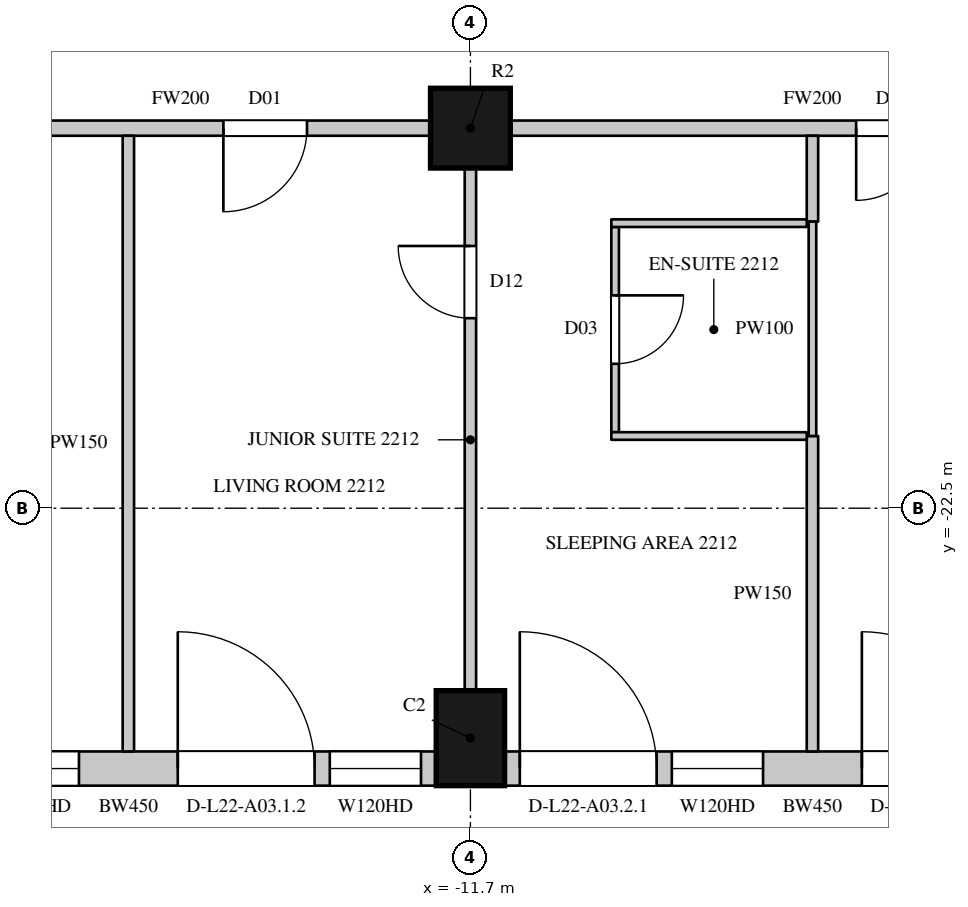
"""IFC4 building model, lengths in metres.
Left out: names, types, materials, properties, quantities, classifications, styles, units other than length and angle.
Written with IfcOpenShell. Run it as: python <this file> out.ifc"""

import sys

from ifc_helpers import new_model, si_unit, direction, frame, frame_2d, origin, origin_2d, place, context, subcontext, project, spatial, rectangle, circle, extrude, element, fill, save


model = new_model("IFC4")
c1 = context("Model", 3, precision=1e-05, world=origin(), true_north=direction((0.0, 1.0)))
c2 = subcontext(c1, "Body", "Model", "MODEL_VIEW")
j1 = project(units=[si_unit("LENGTHUNIT", "METRE"), si_unit("PLANEANGLEUNIT", "RADIAN")], contexts=[c1])
p1 = place(None, origin())
s1 = spatial("IfcSite", under=j1, at=p1, CompositionType="ELEMENT")
p2 = place(p1, origin())
s2 = spatial("IfcBuilding", under=s1, at=p2, CompositionType="ELEMENT")
p3 = place(p2, frame((0.0, 0.0, 109.5)))
s3 = spatial("IfcBuildingStorey", under=s2, at=p3, CompositionType="ELEMENT", Elevation=109.5)
p4 = place(p3, frame((-11.7, -25.525, 0.0), z_axis=(0.0, 0.0, 1.0), x_axis=(1.0, 0.0, 0.0)))
e1 = element("IfcColumn", 1, at=p4, inside=s3, PredefinedType="COLUMN", context=c2, shape_type="SweptSolid", body=[
    extrude(rectangle(XDim=0.9, YDim=1.25, at=origin_2d()), origin(), (0.0, 0.0, 1.0), 3.6),
])
p5 = place(p3, frame((-11.7, -17.5, 0.0), z_axis=(0.0, 0.0, 1.0), x_axis=(1.0, 0.0, 0.0)))
e2 = element("IfcColumn", 2, at=p5, inside=s3, PredefinedType="COLUMN", context=c2, shape_type="SweptSolid", body=[
    extrude(circle(Radius=0.525, at=origin_2d()), origin(), (0.0, 0.0, 1.0), 3.6),
])
p6 = place(p3, frame((-20.25, -25.925, 0.0), z_axis=(0.0, 0.0, 1.0), x_axis=(1.0, 0.0, 0.0)))
e3 = element("IfcWall", 3, at=p6, inside=s3, PredefinedType="SOLIDWALL", context=c2, shape_type="SweptSolid", body=[
    extrude(rectangle(XDim=8.1, YDim=0.45, at=frame_2d((4.05, 0.0))), origin(), (0.0, 0.0, 1.0), 3.3),
])
p7 = place(p6, frame((0.2, 0.0, 0.0)))
e4 = element("IfcOpeningElement", 4, at=p7, cuts=e3, PredefinedType="OPENING", context=c2, shape_type="SweptSolid", body=[
    extrude(rectangle(XDim=1.8, YDim=2.4, at=frame_2d((0.9, 1.2))), frame((0.0, 0.235, 0.0), z_axis=(0.0, -1.0, 0.0), x_axis=(1.0, 0.0, 0.0)), (0.0, 0.0, 1.0), 0.47),
])
p8 = place(p6, frame((2.2, 0.0, 1.05)))
e5 = element("IfcOpeningElement", 5, at=p8, cuts=e3, PredefinedType="OPENING", context=c2, shape_type="SweptSolid", body=[
    extrude(rectangle(XDim=1.2, YDim=2.0, at=frame_2d((0.6, 1.0))), frame((0.0, 0.235, 0.0), z_axis=(0.0, -1.0, 0.0), x_axis=(1.0, 0.0, 0.0)), (0.0, 0.0, 1.0), 0.47),
])
p9 = place(p6, frame((4.7, 0.0, 0.0)))
e6 = element("IfcOpeningElement", 6, at=p9, cuts=e3, PredefinedType="OPENING", context=c2, shape_type="SweptSolid", body=[
    extrude(rectangle(XDim=1.8, YDim=2.4, at=frame_2d((0.9, 1.2))), frame((0.0, 0.235, 0.0), z_axis=(0.0, -1.0, 0.0), x_axis=(1.0, 0.0, 0.0)), (0.0, 0.0, 1.0), 0.47),
])
p10 = place(p6, frame((6.7, 0.0, 1.05)))
e7 = element("IfcOpeningElement", 7, at=p10, cuts=e3, PredefinedType="OPENING", context=c2, shape_type="SweptSolid", body=[
    extrude(rectangle(XDim=1.2, YDim=2.0, at=frame_2d((0.6, 1.0))), frame((0.0, 0.235, 0.0), z_axis=(0.0, -1.0, 0.0), x_axis=(1.0, 0.0, 0.0)), (0.0, 0.0, 1.0), 0.47),
])
p11 = place(p3, frame((-11.25, -25.925, 0.0), z_axis=(0.0, 0.0, 1.0), x_axis=(1.0, 0.0, 0.0)))
e8 = element("IfcWall", 8, at=p11, inside=s3, PredefinedType="SOLIDWALL", context=c2, shape_type="SweptSolid", body=[
    extrude(rectangle(XDim=8.1, YDim=0.45, at=frame_2d((4.05, 0.0))), origin(), (0.0, 0.0, 1.0), 3.3),
])
p12 = place(p11, frame((0.2, 0.0, 0.0)))
e9 = element("IfcOpeningElement", 9, at=p12, cuts=e8, PredefinedType="OPENING", context=c2, shape_type="SweptSolid", body=[
    extrude(rectangle(XDim=1.8, YDim=2.4, at=frame_2d((0.9, 1.2))), frame((0.0, 0.235, 0.0), z_axis=(0.0, -1.0, 0.0), x_axis=(1.0, 0.0, 0.0)), (0.0, 0.0, 1.0), 0.47),
])
p13 = place(p11, frame((2.2, 0.0, 1.05)))
e10 = element("IfcOpeningElement", 10, at=p13, cuts=e8, PredefinedType="OPENING", context=c2, shape_type="SweptSolid", body=[
    extrude(rectangle(XDim=1.2, YDim=2.0, at=frame_2d((0.6, 1.0))), frame((0.0, 0.235, 0.0), z_axis=(0.0, -1.0, 0.0), x_axis=(1.0, 0.0, 0.0)), (0.0, 0.0, 1.0), 0.47),
])
p14 = place(p11, frame((4.7, 0.0, 0.0)))
e11 = element("IfcOpeningElement", 11, at=p14, cuts=e8, PredefinedType="OPENING", context=c2, shape_type="SweptSolid", body=[
    extrude(rectangle(XDim=1.8, YDim=2.4, at=frame_2d((0.9, 1.2))), frame((0.0, 0.235, 0.0), z_axis=(0.0, -1.0, 0.0), x_axis=(1.0, 0.0, 0.0)), (0.0, 0.0, 1.0), 0.47),
])
p15 = place(p11, frame((6.7, 0.0, 1.05)))
e12 = element("IfcOpeningElement", 12, at=p15, cuts=e8, PredefinedType="OPENING", context=c2, shape_type="SweptSolid", body=[
    extrude(rectangle(XDim=1.2, YDim=2.0, at=frame_2d((0.6, 1.0))), frame((0.0, 0.235, 0.0), z_axis=(0.0, -1.0, 0.0), x_axis=(1.0, 0.0, 0.0)), (0.0, 0.0, 1.0), 0.47),
])
p16 = place(p3, frame((-18.8, -17.5, 0.0), z_axis=(0.0, 0.0, 1.0), x_axis=(1.0, 0.0, 0.0)))
e13 = element("IfcWall", 13, at=p16, inside=s3, PredefinedType="PARTITIONING", context=c2, shape_type="SweptSolid", body=[
    extrude(rectangle(XDim=6.575, YDim=0.2, at=frame_2d((3.288, 0.0))), origin(), (0.0, 0.0, 1.0), 2.75),
])
p17 = place(p16, frame((3.85, 0.0, 0.0)))
e14 = element("IfcOpeningElement", 14, at=p17, cuts=e13, PredefinedType="OPENING", context=c2, shape_type="SweptSolid", body=[
    extrude(rectangle(XDim=1.1, YDim=2.4, at=frame_2d((0.55, 1.2))), frame((0.0, 0.11, 0.0), z_axis=(0.0, -1.0, 0.0), x_axis=(1.0, 0.0, 0.0)), (0.0, 0.0, 1.0), 0.22),
])
p18 = place(p3, frame((-11.175, -17.5, 0.0), z_axis=(0.0, 0.0, 1.0), x_axis=(1.0, 0.0, 0.0)))
e15 = element("IfcWall", 15, at=p18, inside=s3, PredefinedType="PARTITIONING", context=c2, shape_type="SweptSolid", body=[
    extrude(rectangle(XDim=7.95, YDim=0.2, at=frame_2d((3.975, 0.0))), origin(), (0.0, 0.0, 1.0), 2.75),
])
p19 = place(p18, frame((4.55, 0.0, 0.0)))
e16 = element("IfcOpeningElement", 16, at=p19, cuts=e15, PredefinedType="OPENING", context=c2, shape_type="SweptSolid", body=[
    extrude(rectangle(XDim=0.95, YDim=2.2, at=frame_2d((0.475, 1.1))), frame((0.0, 0.11, 0.0), z_axis=(0.0, -1.0, 0.0), x_axis=(1.0, 0.0, 0.0)), (0.0, 0.0, 1.0), 0.22),
])
p20 = place(p3, frame((-16.2, -25.7, 0.0), z_axis=(0.0, 0.0, 1.0), x_axis=(0.0, 1.0, 0.0)))
e17 = element("IfcWall", 17, at=p20, inside=s3, PredefinedType="PARTITIONING", context=c2, shape_type="SweptSolid", body=[
    extrude(rectangle(XDim=8.1, YDim=0.15, at=frame_2d((4.05, 0.0))), origin(), (0.0, 0.0, 1.0), 2.65),
])
p21 = place(p3, frame((-11.7, -24.9, 0.0), z_axis=(0.0, 0.0, 1.0), x_axis=(0.0, 1.0, 0.0)))
e18 = element("IfcWall", 18, at=p21, inside=s3, PredefinedType="PARTITIONING", context=c2, shape_type="SweptSolid", body=[
    extrude(rectangle(XDim=6.875, YDim=0.15, at=frame_2d((3.438, 0.0))), origin(), (0.0, 0.0, 1.0), 2.75),
])
p22 = place(p21, frame((4.9, 0.0, 0.0)))
e19 = element("IfcOpeningElement", 19, at=p22, cuts=e18, PredefinedType="OPENING", context=c2, shape_type="SweptSolid", body=[
    extrude(rectangle(XDim=0.95, YDim=2.2, at=frame_2d((0.475, 1.1))), frame((0.0, 0.085, 0.0), z_axis=(0.0, -1.0, 0.0), x_axis=(1.0, 0.0, 0.0)), (0.0, 0.0, 1.0), 0.17),
])
p23 = place(p3, frame((-7.2, -25.7, 0.0), z_axis=(0.0, 0.0, 1.0), x_axis=(0.0, 1.0, 0.0)))
e20 = element("IfcWall", 20, at=p23, inside=s3, PredefinedType="PARTITIONING", context=c2, shape_type="SweptSolid", body=[
    extrude(rectangle(XDim=4.15, YDim=0.15, at=frame_2d((2.075, 0.0))), origin(), (0.0, 0.0, 1.0), 2.65),
])
p24 = place(p3, frame((-7.2, -18.73, 0.0), z_axis=(0.0, 0.0, 1.0), x_axis=(0.0, 1.0, 0.0)))
e21 = element("IfcWall", 21, at=p24, inside=s3, PredefinedType="PARTITIONING", context=c2, shape_type="SweptSolid", body=[
    extrude(rectangle(XDim=1.13, YDim=0.15, at=frame_2d((0.565, 0.0))), origin(), (0.0, 0.0, 1.0), 2.65),
])
p25 = place(p3, frame((-9.796, -21.5, 0.0), z_axis=(0.0, 0.0, 1.0), x_axis=(0.0, 1.0, 0.0)))
e22 = element("IfcWall", 22, at=p25, inside=s3, PredefinedType="PARTITIONING", context=c2, shape_type="SweptSolid", body=[
    extrude(rectangle(XDim=2.7, YDim=0.1, at=frame_2d((1.35, 0.0))), origin(), (0.0, 0.0, 1.0), 3.3),
])
p26 = place(p25, frame((0.9, 0.0, 0.0)))
e23 = element("IfcOpeningElement", 23, at=p26, cuts=e22, PredefinedType="OPENING", context=c2, shape_type="SweptSolid", body=[
    extrude(rectangle(XDim=0.9, YDim=2.2, at=frame_2d((0.45, 1.1))), frame((0.0, 0.06, 0.0), z_axis=(0.0, -1.0, 0.0), x_axis=(1.0, 0.0, 0.0)), (0.0, 0.0, 1.0), 0.12),
])
for number, where, z_axis, x_axis in (
    (24, (-9.846, -21.55, 0.0), (0.0, 0.0, 1.0), (1.0, 0.0, 0.0)),
    (25, (-9.846, -18.75, 0.0), (0.0, 0.0, 1.0), (1.0, 0.0, 0.0)),
):
    element("IfcWall", number, at=place(p3, frame(where, z_axis=z_axis, x_axis=x_axis)), inside=s3, PredefinedType="PARTITIONING", context=c2, shape_type="SweptSolid", body=[
        extrude(rectangle(XDim=2.571, YDim=0.1, at=frame_2d((1.286, 0.0))), origin(), (0.0, 0.0, 1.0), 3.3),
    ])
p27 = place(p3, frame((-7.2, -21.55, 0.0), z_axis=(0.0, 0.0, 1.0), x_axis=(0.0, 1.0, 0.0)))
e26 = element("IfcWall", 26, at=p27, inside=s3, PredefinedType="PARTITIONING", context=c2, shape_type="SweptSolid", body=[
    extrude(rectangle(XDim=2.82, YDim=0.1, at=frame_2d((1.41, 0.0))), origin(), (0.0, 0.0, 1.0), 2.65),
])
p28 = place(p8, origin())
e27 = element("IfcWindow", 27, at=p28, inside=s3, PartitioningType="SINGLE_PANEL", PredefinedType="WINDOW", context=c2, shape_type="SweptSolid", body=[
    extrude(rectangle(XDim=1.2, YDim=2.0, at=frame_2d((0.6, 1.0))), frame((0.0, 0.135, 0.0), z_axis=(0.0, -1.0, 0.0), x_axis=(1.0, 0.0, 0.0)), (0.0, 0.0, 1.0), 0.06),
])
fill(e5, e27)
p29 = place(p9, origin())
e28 = element("IfcDoor", 28, at=p29, inside=s3, OperationType="SLIDING_TO_LEFT", PredefinedType="DOOR", context=c2, shape_type="SweptSolid", body=[
    extrude(rectangle(XDim=1.8, YDim=2.4, at=frame_2d((0.9, 1.2))), frame((0.0, 0.13, 0.0), z_axis=(0.0, -1.0, 0.0), x_axis=(1.0, 0.0, 0.0)), (0.0, 0.0, 1.0), 0.05),
])
fill(e6, e28)
p30 = place(p10, origin())
e29 = element("IfcWindow", 29, at=p30, inside=s3, PartitioningType="SINGLE_PANEL", PredefinedType="WINDOW", context=c2, shape_type="SweptSolid", body=[
    extrude(rectangle(XDim=1.2, YDim=2.0, at=frame_2d((0.6, 1.0))), frame((0.0, 0.135, 0.0), z_axis=(0.0, -1.0, 0.0), x_axis=(1.0, 0.0, 0.0)), (0.0, 0.0, 1.0), 0.06),
])
fill(e7, e29)
p31 = place(p12, origin())
e30 = element("IfcDoor", 30, at=p31, inside=s3, OperationType="SLIDING_TO_LEFT", PredefinedType="DOOR", context=c2, shape_type="SweptSolid", body=[
    extrude(rectangle(XDim=1.8, YDim=2.4, at=frame_2d((0.9, 1.2))), frame((0.0, 0.13, 0.0), z_axis=(0.0, -1.0, 0.0), x_axis=(1.0, 0.0, 0.0)), (0.0, 0.0, 1.0), 0.05),
])
fill(e9, e30)
p32 = place(p13, origin())
e31 = element("IfcWindow", 31, at=p32, inside=s3, PartitioningType="SINGLE_PANEL", PredefinedType="WINDOW", context=c2, shape_type="SweptSolid", body=[
    extrude(rectangle(XDim=1.2, YDim=2.0, at=frame_2d((0.6, 1.0))), frame((0.0, 0.135, 0.0), z_axis=(0.0, -1.0, 0.0), x_axis=(1.0, 0.0, 0.0)), (0.0, 0.0, 1.0), 0.06),
])
fill(e10, e31)
p33 = place(p14, origin())
e32 = element("IfcDoor", 32, at=p33, inside=s3, OperationType="SLIDING_TO_LEFT", PredefinedType="DOOR", context=c2, shape_type="SweptSolid", body=[
    extrude(rectangle(XDim=1.8, YDim=2.4, at=frame_2d((0.9, 1.2))), frame((0.0, 0.13, 0.0), z_axis=(0.0, -1.0, 0.0), x_axis=(1.0, 0.0, 0.0)), (0.0, 0.0, 1.0), 0.05),
])
fill(e11, e32)
p34 = place(p17, origin())
e33 = element("IfcDoor", 33, at=p34, inside=s3, OperationType="SINGLE_SWING_RIGHT", PredefinedType="DOOR", context=c2, shape_type="SweptSolid", body=[
    extrude(rectangle(XDim=1.1, YDim=2.4, at=frame_2d((0.55, 1.2))), frame((0.0, 0.025, 0.0), z_axis=(0.0, -1.0, 0.0), x_axis=(1.0, 0.0, 0.0)), (0.0, 0.0, 1.0), 0.05),
])
fill(e14, e33)
p35 = place(p22, origin())
e34 = element("IfcDoor", 34, at=p35, inside=s3, OperationType="SINGLE_SWING_RIGHT", PredefinedType="DOOR", context=c2, shape_type="SweptSolid", body=[
    extrude(rectangle(XDim=0.95, YDim=2.2, at=frame_2d((0.475, 1.1))), frame((0.0, 0.025, 0.0), z_axis=(0.0, -1.0, 0.0), x_axis=(1.0, 0.0, 0.0)), (0.0, 0.0, 1.0), 0.05),
])
fill(e19, e34)
p36 = place(p26, origin())
e35 = element("IfcDoor", 35, at=p36, inside=s3, OperationType="SINGLE_SWING_LEFT", PredefinedType="DOOR", context=c2, shape_type="SweptSolid", body=[
    extrude(rectangle(XDim=0.9, YDim=2.2, at=frame_2d((0.45, 1.1))), frame((0.0, 0.025, 0.0), z_axis=(0.0, -1.0, 0.0), x_axis=(1.0, 0.0, 0.0)), (0.0, 0.0, 1.0), 0.05),
])
fill(e23, e35)
p37 = place(p19, origin())
e36 = element("IfcDoor", 36, at=p37, inside=s3, OperationType="SINGLE_SWING_RIGHT", PredefinedType="DOOR", context=c2, shape_type="SweptSolid", body=[
    extrude(rectangle(XDim=0.95, YDim=2.2, at=frame_2d((0.475, 1.1))), frame((0.0, 0.025, 0.0), z_axis=(0.0, -1.0, 0.0), x_axis=(1.0, 0.0, 0.0)), (0.0, 0.0, 1.0), 0.05),
])
fill(e16, e36)
save(model, sys.argv[1])
